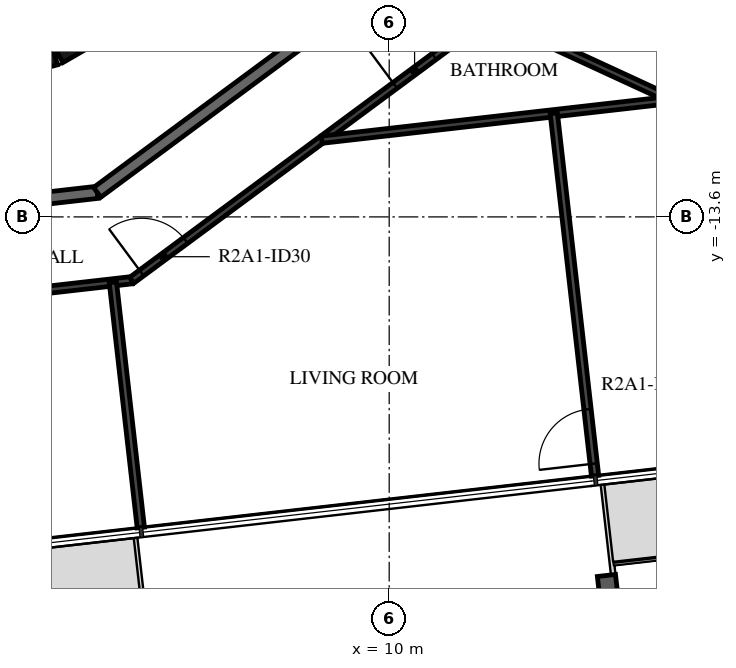
"""IFC4 building model, lengths in metres.
Left out: names, types, materials, properties, quantities, classifications, styles, units other than length and angle.
Written with IfcOpenShell. Run it as: python <this file> out.ifc"""

import sys

from ifc_helpers import new_model, si_unit, direction, frame, frame_2d, origin, origin_2d, place, context, subcontext, project, spatial, rectangle, i_section, extrude, element, fill, save


model = new_model("IFC4")
c1 = context("Model", 3, precision=1e-05, world=origin(), true_north=direction((0.0, 1.0)))
c2 = subcontext(c1, "Body", "Model", "MODEL_VIEW")
j1 = project(units=[si_unit("LENGTHUNIT", "METRE"), si_unit("PLANEANGLEUNIT", "RADIAN")], contexts=[c1])
p1 = place(None, origin())
s1 = spatial("IfcSite", under=j1, at=p1, CompositionType="ELEMENT")
p2 = place(p1, origin())
s2 = spatial("IfcBuilding", under=s1, at=p2, CompositionType="ELEMENT")
p3 = place(p2, frame((0.0, 0.0, 80.2)))
s3 = spatial("IfcBuildingStorey", under=s2, at=p3, CompositionType="ELEMENT", Elevation=80.2)
p4 = place(p3, frame((13.624, -19.944, -0.38), z_axis=(0.0, 0.0, 1.0), x_axis=(-0.993571881569, -0.113202986513, 0.0)))
e1 = element("IfcColumn", 1, at=p4, inside=s3, PredefinedType="COLUMN", context=c2, shape_type="SweptSolid", body=[
    extrude(i_section(OverallWidth=0.3, OverallDepth=0.9, WebThickness=0.019, FlangeThickness=0.035, FilletRadius=0.03, at=origin_2d()), origin(), (0.0, 0.0, 1.0), 3.5),
])
p5 = place(p3, frame((1.55, -11.643, 0.0), z_axis=(0.0, 0.0, 1.0), x_axis=(0.965948410781, 0.258734743916, 0.0)))
e2 = element("IfcWall", 2, at=p5, inside=s3, PredefinedType="SHEAR", context=c2, shape_type="SweptSolid", body=[
    extrude(rectangle(XDim=3.033, YDim=0.5, at=frame_2d((1.516, 0.0))), origin(), (0.0, 0.0, 1.0), 3.12),
])
p6 = place(p3, frame((4.51, -10.845, 0.0), z_axis=(0.0, 0.0, 1.0), x_axis=(0.865975092491, 0.500087131594, 0.0)))
e3 = element("IfcWall", 3, at=p6, inside=s3, PredefinedType="SHEAR", context=c2, shape_type="SweptSolid", body=[
    extrude(rectangle(XDim=3.033, YDim=0.5, at=frame_2d((1.516, 0.0))), origin(), (0.0, 0.0, 1.0), 3.12),
])
p7 = place(p6, frame((1.066, 0.0, 0.0)))
e4 = element("IfcOpeningElement", 4, at=p7, cuts=e3, PredefinedType="OPENING", context=c2, shape_type="SweptSolid", body=[
    extrude(rectangle(XDim=0.9, YDim=2.1, at=frame_2d((0.45, 1.05))), frame((0.0, 0.26, 0.0), z_axis=(0.0, -1.0, 0.0), x_axis=(1.0, 0.0, 0.0)), (0.0, 0.0, 1.0), 0.52),
])
p8 = place(p3, frame((-2.096, -14.028, 0.0), z_axis=(0.0, 0.0, 1.0), x_axis=(0.993569170114, 0.113226782163, 0.0)))
e5 = element("IfcWall", 5, at=p8, inside=s3, PredefinedType="STANDARD", context=c2, shape_type="SweptSolid", body=[
    extrude(rectangle(XDim=7.342, YDim=0.2, at=frame_2d((3.671, 0.0))), origin(), (0.0, 0.0, 1.0), 3.12),
])
p9 = place(p8, frame((0.5, 0.0, 0.0)))
e6 = element("IfcOpeningElement", 6, at=p9, cuts=e5, PredefinedType="OPENING", context=c2, shape_type="SweptSolid", body=[
    extrude(rectangle(XDim=1.0, YDim=2.1, at=frame_2d((0.5, 1.05))), frame((0.0, 0.11, 0.0), z_axis=(0.0, -1.0, 0.0), x_axis=(1.0, 0.0, 0.0)), (0.0, 0.0, 1.0), 0.22),
])
p10 = place(p3, frame((5.198, -13.196, 0.0), z_axis=(0.0, 0.0, 1.0), x_axis=(0.803869883159, 0.594805187394, 0.0)))
e7 = element("IfcWall", 7, at=p10, inside=s3, PredefinedType="STANDARD", context=c2, shape_type="SweptSolid", body=[
    extrude(rectangle(XDim=7.342, YDim=0.2, at=frame_2d((3.671, 0.0))), origin(), (0.0, 0.0, 1.0), 3.12),
])
p11 = place(p3, frame((3.138, -14.941, 0.0), z_axis=(0.0, 0.0, 1.0), x_axis=(0.99356355736, 0.113276023437, 0.0)))
e8 = element("IfcWall", 8, at=p11, inside=s3, PredefinedType="PARTITIONING", context=c2, shape_type="SweptSolid", body=[
    extrude(rectangle(XDim=2.647, YDim=0.12, at=frame_2d((1.323, 0.0))), origin(), (0.0, 0.0, 1.0), 3.12),
])
p12 = place(p3, frame((5.767, -14.641, 0.0), z_axis=(0.0, 0.0, 1.0), x_axis=(0.803867427863, 0.594808505673, 0.0)))
e9 = element("IfcWall", 9, at=p12, inside=s3, PredefinedType="PARTITIONING", context=c2, shape_type="SweptSolid", body=[
    extrude(rectangle(XDim=7.316, YDim=0.12, at=frame_2d((3.658, 0.0))), origin(), (0.0, 0.0, 1.0), 3.12),
])
p13 = place(p12, frame((0.2, 0.0, 0.0)))
e10 = element("IfcOpeningElement", 10, at=p13, cuts=e9, PredefinedType="OPENING", context=c2, shape_type="SweptSolid", body=[
    extrude(rectangle(XDim=0.9, YDim=2.1, at=frame_2d((0.45, 1.05))), frame((0.0, 0.07, 0.0), z_axis=(0.0, -1.0, 0.0), x_axis=(1.0, 0.0, 0.0)), (0.0, 0.0, 1.0), 0.14),
])
p14 = place(p12, frame((5.385, 0.0, 0.0)))
e11 = element("IfcOpeningElement", 11, at=p14, cuts=e9, PredefinedType="OPENING", context=c2, shape_type="SweptSolid", body=[
    extrude(rectangle(XDim=0.8, YDim=2.1, at=frame_2d((0.4, 1.05))), frame((0.0, 0.07, 0.0), z_axis=(0.0, -1.0, 0.0), x_axis=(1.0, 0.0, 0.0)), (0.0, 0.0, 1.0), 0.14),
])
p15 = place(p3, frame((11.649, -10.289, 0.0), z_axis=(0.0, 0.0, 1.0), x_axis=(0.9079269461, -0.419128453514, 0.0)))
e12 = element("IfcWall", 12, at=p15, inside=s3, PredefinedType="PARTITIONING", context=c2, shape_type="SweptSolid", body=[
    extrude(rectangle(XDim=3.304, YDim=0.12, at=frame_2d((1.652, 0.0))), origin(), (0.0, 0.0, 1.0), 3.12),
])
p16 = place(p3, frame((5.915, -18.708, 0.0), z_axis=(0.0, 0.0, 1.0), x_axis=(-0.113244511591, 0.993567149515, 0.0)))
e13 = element("IfcWall", 13, at=p16, inside=s3, PredefinedType="PARTITIONING", context=c2, shape_type="SweptSolid", body=[
    extrude(rectangle(XDim=4.057, YDim=0.12, at=frame_2d((2.029, 0.0))), origin(), (0.0, 0.0, 1.0), 2.73),
])
p17 = place(p3, frame((14.649, -11.674, 0.0), z_axis=(0.0, 0.0, 1.0), x_axis=(-0.993573746873, -0.113186613721, 0.0)))
e14 = element("IfcWall", 14, at=p17, inside=s3, PredefinedType="PARTITIONING", context=c2, shape_type="SweptSolid", body=[
    extrude(rectangle(XDim=5.796, YDim=0.12, at=frame_2d((2.898, 0.0))), origin(), (0.0, 0.0, 1.0), 3.12),
])
p18 = place(p3, frame((13.386, -17.857, 0.0), z_axis=(0.0, 0.0, 1.0), x_axis=(-0.113200012983, 0.993572220355, 0.0)))
e15 = element("IfcWall", 15, at=p18, inside=s3, PredefinedType="PARTITIONING", context=c2, shape_type="SweptSolid", body=[
    extrude(rectangle(XDim=6.0, YDim=0.12, at=frame_2d((3.0, 0.0))), origin(), (0.0, 0.0, 1.0), 2.73),
])
p19 = place(p18, frame((0.2, 0.0, 0.0)))
e16 = element("IfcOpeningElement", 16, at=p19, cuts=e15, PredefinedType="OPENING", context=c2, shape_type="SweptSolid", body=[
    extrude(rectangle(XDim=0.9, YDim=2.1, at=frame_2d((0.45, 1.05))), frame((0.0, 0.07, 0.0), z_axis=(0.0, -1.0, 0.0), x_axis=(1.0, 0.0, 0.0)), (0.0, 0.0, 1.0), 0.14),
])
p20 = place(p13, origin())
e17 = element("IfcDoor", 17, at=p20, inside=s3, OperationType="SINGLE_SWING_RIGHT", PredefinedType="DOOR", context=c2, shape_type="SweptSolid", body=[
    extrude(rectangle(XDim=0.9, YDim=2.1, at=frame_2d((0.45, 1.05))), frame((0.0, 0.025, 0.0), z_axis=(0.0, -1.0, 0.0), x_axis=(1.0, 0.0, 0.0)), (0.0, 0.0, 1.0), 0.05),
])
fill(e10, e17)
p21 = place(p14, origin())
e18 = element("IfcDoor", 18, at=p21, inside=s3, OperationType="SINGLE_SWING_RIGHT", PredefinedType="DOOR", context=c2, shape_type="SweptSolid", body=[
    extrude(rectangle(XDim=0.8, YDim=2.1, at=frame_2d((0.4, 1.05))), frame((0.0, 0.025, 0.0), z_axis=(0.0, -1.0, 0.0), x_axis=(1.0, 0.0, 0.0)), (0.0, 0.0, 1.0), 0.05),
])
fill(e11, e18)
p22 = place(p19, origin())
e19 = element("IfcDoor", 19, at=p22, inside=s3, OperationType="SINGLE_SWING_RIGHT", PredefinedType="DOOR", context=c2, shape_type="SweptSolid", body=[
    extrude(rectangle(XDim=0.9, YDim=2.1, at=frame_2d((0.45, 1.05))), frame((0.0, 0.025, 0.0), z_axis=(0.0, -1.0, 0.0), x_axis=(1.0, 0.0, 0.0)), (0.0, 0.0, 1.0), 0.05),
])
fill(e16, e19)
save(model, sys.argv[1])
